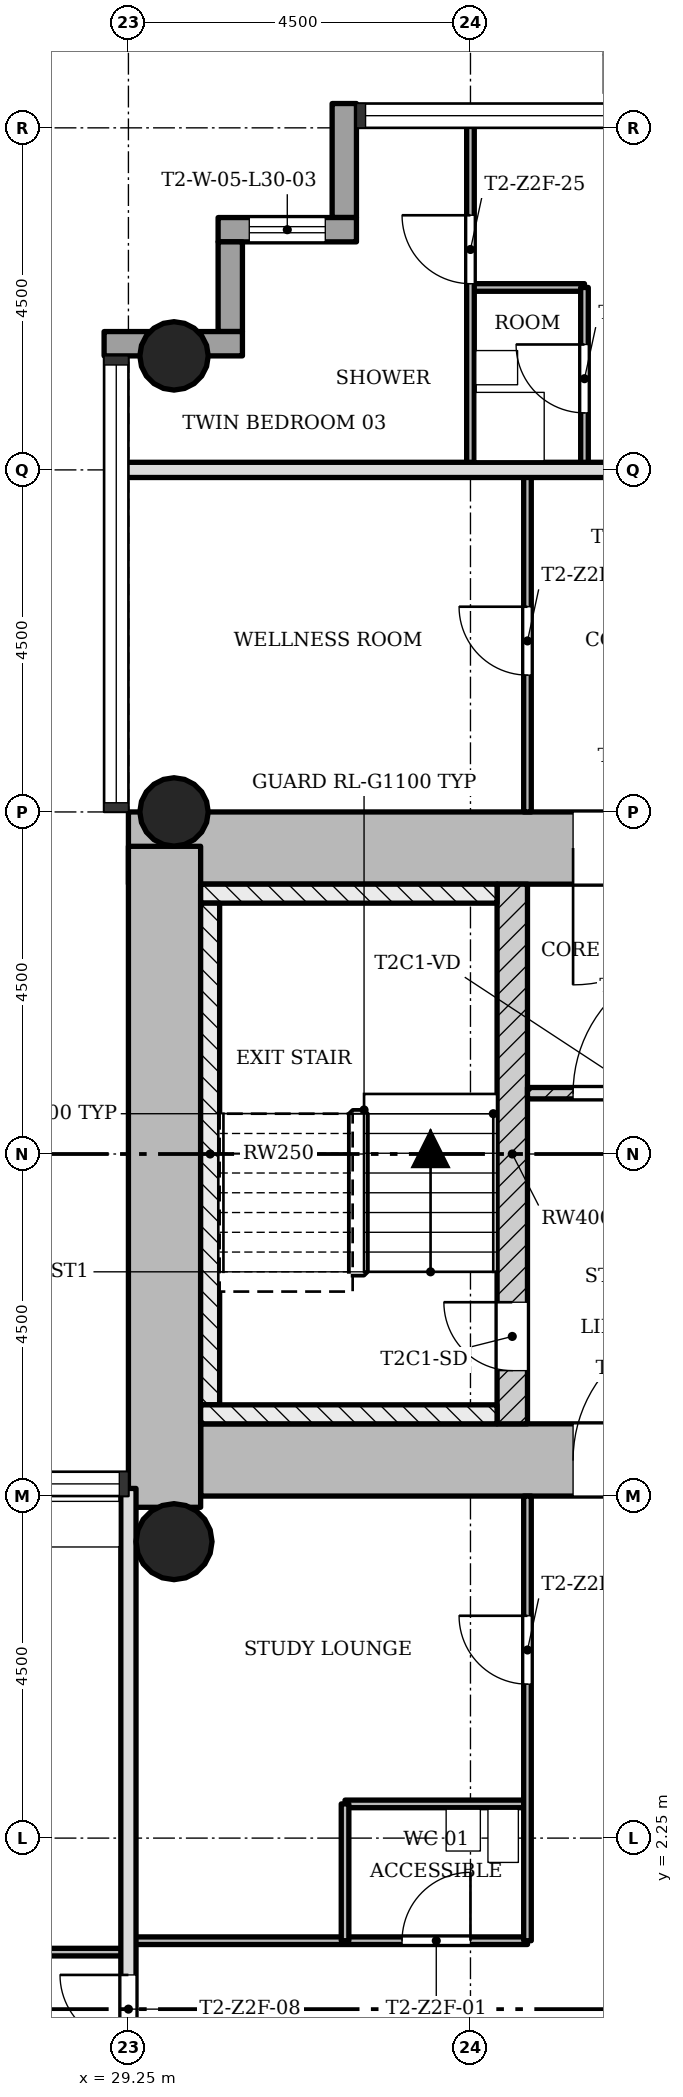
"""IFC4 building model, lengths in metres.
Left out: names, types, materials, properties, quantities, classifications, styles, units other than length and angle.
Written with IfcOpenShell. Run it as: python <this file> out.ifc"""

import sys

from ifc_helpers import new_model, si_unit, direction, frame, frame_2d, origin, origin_2d, place, context, subcontext, project, spatial, rectangle, hollow_circle, extrude, element, fill, save


model = new_model("IFC4")
c1 = context("Model", 3, precision=1e-05, world=origin(), true_north=direction((0.0, 1.0)))
c2 = subcontext(c1, "Body", "Model", "MODEL_VIEW")
j1 = project(units=[si_unit("LENGTHUNIT", "METRE"), si_unit("PLANEANGLEUNIT", "RADIAN")], contexts=[c1])
p1 = place(None, origin())
s1 = spatial("IfcSite", under=j1, at=p1, CompositionType="ELEMENT")
p2 = place(p1, origin())
s2 = spatial("IfcBuilding", under=s1, at=p2, CompositionType="ELEMENT")
p3 = place(p2, frame((0.0, 0.0, 110.6)))
s3 = spatial("IfcBuildingStorey", under=s2, at=p3, CompositionType="ELEMENT", Elevation=110.6)
p4 = place(p3, frame((30.2, 7.225, 0.0), z_axis=(0.0, 0.0, 1.0), x_axis=(1.0, 0.0, 0.0)))
e1 = element("IfcWall", 1, at=p4, inside=s3, PredefinedType="SHEAR", context=c2, shape_type="SweptSolid", body=[
    extrude(rectangle(XDim=12.55, YDim=0.95, at=frame_2d((6.275, 0.0))), origin(), (0.0, 0.0, 1.0), 3.4),
])
p5 = place(p4, frame((4.9, 0.0, 0.0)))
e2 = element("IfcOpeningElement", 2, at=p5, cuts=e1, PredefinedType="OPENING", context=c2, shape_type="SweptSolid", body=[
    extrude(rectangle(XDim=1.8, YDim=2.1, at=frame_2d((0.9, 1.05))), frame((0.0, 0.485, 0.0), z_axis=(0.0, -1.0, 0.0), x_axis=(1.0, 0.0, 0.0)), (0.0, 0.0, 1.0), 0.97),
])
p6 = place(p3, frame((41.8, 15.275, 0.0), z_axis=(0.0, 0.0, 1.0), x_axis=(-1.0, 0.0, 0.0)))
e3 = element("IfcWall", 3, at=p6, inside=s3, PredefinedType="SHEAR", context=c2, shape_type="SweptSolid", body=[
    extrude(rectangle(XDim=12.55, YDim=0.95, at=frame_2d((6.275, 0.0))), origin(), (0.0, 0.0, 1.0), 3.4),
])
p7 = place(p6, frame((4.9, 0.0, 0.0)))
e4 = element("IfcOpeningElement", 4, at=p7, cuts=e3, PredefinedType="OPENING", context=c2, shape_type="SweptSolid", body=[
    extrude(rectangle(XDim=1.8, YDim=2.1, at=frame_2d((0.9, 1.05))), frame((0.0, 0.485, 0.0), z_axis=(0.0, -1.0, 0.0), x_axis=(1.0, 0.0, 0.0)), (0.0, 0.0, 1.0), 0.97),
])
p8 = place(p3, frame((29.725, 15.298, 0.0), z_axis=(0.0, 0.0, 1.0), x_axis=(0.0, -1.0, 0.0)))
e5 = element("IfcWall", 5, at=p8, inside=s3, PredefinedType="SHEAR", context=c2, shape_type="SweptSolid", body=[
    extrude(rectangle(XDim=8.696, YDim=0.95, at=frame_2d((4.348, 0.0))), origin(), (0.0, 0.0, 1.0), 3.4),
])
p9 = place(p3, frame((34.3, 7.7, 0.0), z_axis=(0.0, 0.0, 1.0), x_axis=(0.0, 1.0, 0.0)))
e6 = element("IfcWall", 6, at=p9, inside=s3, PredefinedType="SHEAR", context=c2, shape_type="SweptSolid", body=[
    extrude(rectangle(XDim=7.1, YDim=0.4, at=frame_2d((3.55, 0.0))), origin(), (0.0, 0.0, 1.0), 3.4),
])
p10 = place(p9, frame((0.7, 0.0, 0.0)))
e7 = element("IfcOpeningElement", 7, at=p10, cuts=e6, PredefinedType="OPENING", context=c2, shape_type="SweptSolid", body=[
    extrude(rectangle(XDim=0.9, YDim=2.1, at=frame_2d((0.45, 1.05))), frame((0.0, 0.21, 0.0), z_axis=(0.0, -1.0, 0.0), x_axis=(1.0, 0.0, 0.0)), (0.0, 0.0, 1.0), 0.42),
])
for number, where, z_axis, x_axis in (
    (8, (29.85, 15.75, 0.0), (0.0, 0.0, 1.0), (1.0, 0.0, 0.0)),
    (9, (29.85, 21.75, 0.0), (0.0, 0.0, 1.0), (1.0, 0.0, 0.0)),
):
    element("IfcColumn", number, at=place(p3, frame(where, z_axis=z_axis, x_axis=x_axis)), inside=s3, PredefinedType="COLUMN", context=c2, shape_type="SweptSolid", body=[
        extrude(hollow_circle(Radius=0.45, WallThickness=0.032, at=origin_2d()), origin(), (0.0, 0.0, 1.0), 3.4),
    ])
p11 = place(p3, frame((29.85, 6.15, 0.0), z_axis=(0.0, 0.0, 1.0), x_axis=(1.0, 0.0, 0.0)))
e10 = element("IfcColumn", 10, at=p11, inside=s3, PredefinedType="COLUMN", context=c2, shape_type="SweptSolid", body=[
    extrude(hollow_circle(Radius=0.5, WallThickness=0.036, at=origin_2d()), origin(), (0.0, 0.0, 1.0), 3.4),
])
p12 = place(p3, frame((32.09, 25.07, -0.3), z_axis=(0.0, 0.0, 1.0), x_axis=(0.0, -1.0, 0.0)))
e11 = element("IfcWall", 11, at=p12, inside=s3, PredefinedType="STANDARD", context=c2, shape_type="SweptSolid", body=[
    extrude(rectangle(XDim=1.5, YDim=0.32, at=frame_2d((0.75, 0.0))), origin(), (0.0, 0.0, 1.0), 3.4),
])
p13 = place(p3, frame((32.25, 23.41, -0.3), z_axis=(0.0, 0.0, 1.0), x_axis=(-1.0, 0.0, 0.0)))
e12 = element("IfcWall", 12, at=p13, inside=s3, PredefinedType="STANDARD", context=c2, shape_type="SweptSolid", body=[
    extrude(rectangle(XDim=1.82, YDim=0.32, at=frame_2d((0.91, 0.0))), origin(), (0.0, 0.0, 1.0), 3.4),
])
p14 = place(p13, frame((0.41, 0.0, 1.2)))
e13 = element("IfcOpeningElement", 13, at=p14, cuts=e12, PredefinedType="OPENING", context=c2, shape_type="SweptSolid", body=[
    extrude(rectangle(XDim=1.0, YDim=1.5, at=frame_2d((0.5, 0.75))), frame((0.0, 0.17, 0.0), z_axis=(0.0, -1.0, 0.0), x_axis=(1.0, 0.0, 0.0)), (0.0, 0.0, 1.0), 0.34),
])
p15 = place(p3, frame((30.59, 23.25, -0.3), z_axis=(0.0, 0.0, 1.0), x_axis=(0.0, -1.0, 0.0)))
e14 = element("IfcWall", 14, at=p15, inside=s3, PredefinedType="STANDARD", context=c2, shape_type="SweptSolid", body=[
    extrude(rectangle(XDim=1.18, YDim=0.32, at=frame_2d((0.59, 0.0))), origin(), (0.0, 0.0, 1.0), 3.4),
])
p16 = place(p3, frame((30.75, 21.91, -0.3), z_axis=(0.0, 0.0, 1.0), x_axis=(-1.0, 0.0, 0.0)))
e15 = element("IfcWall", 15, at=p16, inside=s3, PredefinedType="STANDARD", context=c2, shape_type="SweptSolid", body=[
    extrude(rectangle(XDim=1.82, YDim=0.32, at=frame_2d((0.91, 0.0))), origin(), (0.0, 0.0, 1.0), 3.4),
])
p17 = place(p3, frame((37.5, 12.05, 0.0), z_axis=(0.0, 0.0, 1.0), x_axis=(-1.0, 0.0, 0.0)))
e16 = element("IfcWall", 16, at=p17, inside=s3, PredefinedType="PARTITIONING", context=c2, shape_type="SweptSolid", body=[
    extrude(rectangle(XDim=3.0, YDim=0.15, at=frame_2d((1.5, 0.0))), origin(), (0.0, 0.0, 1.0), 3.0),
])
p18 = place(p17, frame((0.6, 0.0, 0.0)))
e17 = element("IfcOpeningElement", 17, at=p18, cuts=e16, PredefinedType="OPENING", context=c2, shape_type="SweptSolid", body=[
    extrude(rectangle(XDim=1.8, YDim=2.1, at=frame_2d((0.9, 1.05))), frame((0.0, 0.085, 0.0), z_axis=(0.0, -1.0, 0.0), x_axis=(1.0, 0.0, 0.0)), (0.0, 0.0, 1.0), 0.17),
])
p19 = place(p3, frame((29.25, 0.75, 0.0), z_axis=(0.0, 0.0, 1.0), x_axis=(-1.0, 0.0, 0.0)))
e18 = element("IfcWall", 18, at=p19, inside=s3, PredefinedType="PARTITIONING", context=c2, shape_type="SweptSolid", body=[
    extrude(rectangle(XDim=7.8, YDim=0.1, at=frame_2d((3.9, 0.0))), origin(), (0.0, 0.0, 1.0), 3.0),
])
p20 = place(p19, frame((1.8, 0.0, 0.0)))
e19 = element("IfcOpeningElement", 19, at=p20, cuts=e18, PredefinedType="OPENING", context=c2, shape_type="SweptSolid", body=[
    extrude(rectangle(XDim=0.9, YDim=2.1, at=frame_2d((0.45, 1.05))), frame((0.0, 0.06, 0.0), z_axis=(0.0, -1.0, 0.0), x_axis=(1.0, 0.0, 0.0)), (0.0, 0.0, 1.0), 0.12),
])
p21 = place(p19, frame((4.95, 0.0, 0.0)))
e20 = element("IfcOpeningElement", 20, at=p21, cuts=e18, PredefinedType="OPENING", context=c2, shape_type="SweptSolid", body=[
    extrude(rectangle(XDim=0.9, YDim=2.1, at=frame_2d((0.45, 1.05))), frame((0.0, 0.06, 0.0), z_axis=(0.0, -1.0, 0.0), x_axis=(1.0, 0.0, 0.0)), (0.0, 0.0, 1.0), 0.12),
])
p22 = place(p19, frame((6.6, 0.0, 0.0)))
e21 = element("IfcOpeningElement", 21, at=p22, cuts=e18, PredefinedType="OPENING", context=c2, shape_type="SweptSolid", body=[
    extrude(rectangle(XDim=0.9, YDim=2.1, at=frame_2d((0.45, 1.05))), frame((0.0, 0.06, 0.0), z_axis=(0.0, -1.0, 0.0), x_axis=(1.0, 0.0, 0.0)), (0.0, 0.0, 1.0), 0.12),
])
p23 = place(p3, frame((34.5, 0.9, 0.0), z_axis=(0.0, 0.0, 1.0), x_axis=(-1.0, 0.0, 0.0)))
e22 = element("IfcWall", 22, at=p23, inside=s3, PredefinedType="PARTITIONING", context=c2, shape_type="SweptSolid", body=[
    extrude(rectangle(XDim=5.25, YDim=0.1, at=frame_2d((2.625, 0.0))), origin(), (0.0, 0.0, 1.0), 3.0),
])
p24 = place(p23, frame((0.75, 0.0, 0.0)))
e23 = element("IfcOpeningElement", 23, at=p24, cuts=e22, PredefinedType="OPENING", context=c2, shape_type="SweptSolid", body=[
    extrude(rectangle(XDim=0.9, YDim=2.1, at=frame_2d((0.45, 1.05))), frame((0.0, 0.06, 0.0), z_axis=(0.0, -1.0, 0.0), x_axis=(1.0, 0.0, 0.0)), (0.0, 0.0, 1.0), 0.12),
])
p25 = place(p3, frame((34.5, 2.7, 0.0), z_axis=(0.0, 0.0, 1.0), x_axis=(-1.0, 0.0, 0.0)))
e24 = element("IfcWall", 24, at=p25, inside=s3, PredefinedType="PARTITIONING", context=c2, shape_type="SweptSolid", body=[
    extrude(rectangle(XDim=2.4, YDim=0.1, at=frame_2d((1.2, 0.0))), origin(), (0.0, 0.0, 1.0), 3.0),
])
p26 = place(p3, frame((42.85, 20.25, 0.0), z_axis=(0.0, 0.0, 1.0), x_axis=(-1.0, 0.0, 0.0)))
e25 = element("IfcWall", 25, at=p26, inside=s3, PredefinedType="SOLIDWALL", context=c2, shape_type="SweptSolid", body=[
    extrude(rectangle(XDim=13.7, YDim=0.2, at=frame_2d((6.85, 0.0))), origin(), (0.0, 0.0, 1.0), 3.0),
])
p27 = place(p26, frame((6.4, 0.0, 0.0)))
e26 = element("IfcOpeningElement", 26, at=p27, cuts=e25, PredefinedType="OPENING", context=c2, shape_type="SweptSolid", body=[
    extrude(rectangle(XDim=0.9, YDim=2.1, at=frame_2d((0.45, 1.05))), frame((0.0, 0.11, 0.0), z_axis=(0.0, -1.0, 0.0), x_axis=(1.0, 0.0, 0.0)), (0.0, 0.0, 1.0), 0.22),
])
p28 = place(p3, frame((35.25, 22.65, 0.0), z_axis=(0.0, 0.0, 1.0), x_axis=(-1.0, 0.0, 0.0)))
e27 = element("IfcWall", 27, at=p28, inside=s3, PredefinedType="PARTITIONING", context=c2, shape_type="SweptSolid", body=[
    extrude(rectangle(XDim=1.5, YDim=0.1, at=frame_2d((0.75, 0.0))), origin(), (0.0, 0.0, 1.0), 3.0),
])
p29 = place(p3, frame((35.25, 20.25, 0.0), z_axis=(0.0, 0.0, 1.0), x_axis=(0.0, 1.0, 0.0)))
e28 = element("IfcWall", 28, at=p29, inside=s3, PredefinedType="PARTITIONING", context=c2, shape_type="SweptSolid", body=[
    extrude(rectangle(XDim=2.4, YDim=0.1, at=frame_2d((1.2, 0.0))), origin(), (0.0, 0.0, 1.0), 3.0),
])
p30 = place(p29, frame((0.75, 0.0, 0.0)))
e29 = element("IfcOpeningElement", 29, at=p30, cuts=e28, PredefinedType="OPENING", context=c2, shape_type="SweptSolid", body=[
    extrude(rectangle(XDim=0.9, YDim=2.1, at=frame_2d((0.45, 1.05))), frame((0.0, 0.06, 0.0), z_axis=(0.0, -1.0, 0.0), x_axis=(1.0, 0.0, 0.0)), (0.0, 0.0, 1.0), 0.12),
])
p31 = place(p3, frame((34.5, 0.9, 0.0), z_axis=(0.0, 0.0, 1.0), x_axis=(0.0, 1.0, 0.0)))
e30 = element("IfcWall", 30, at=p31, inside=s3, PredefinedType="PARTITIONING", context=c2, shape_type="SweptSolid", body=[
    extrude(rectangle(XDim=5.85, YDim=0.1, at=frame_2d((2.925, 0.0))), origin(), (0.0, 0.0, 1.0), 3.0),
])
p32 = place(p31, frame((3.375, 0.0, 0.0)))
e31 = element("IfcOpeningElement", 31, at=p32, cuts=e30, PredefinedType="OPENING", context=c2, shape_type="SweptSolid", body=[
    extrude(rectangle(XDim=0.9, YDim=2.1, at=frame_2d((0.45, 1.05))), frame((0.0, 0.06, 0.0), z_axis=(0.0, -1.0, 0.0), x_axis=(1.0, 0.0, 0.0)), (0.0, 0.0, 1.0), 0.12),
])
p33 = place(p3, frame((34.5, 15.75, 0.0), z_axis=(0.0, 0.0, 1.0), x_axis=(0.0, 1.0, 0.0)))
e32 = element("IfcWall", 32, at=p33, inside=s3, PredefinedType="PARTITIONING", context=c2, shape_type="SweptSolid", body=[
    extrude(rectangle(XDim=4.5, YDim=0.1, at=frame_2d((2.25, 0.0))), origin(), (0.0, 0.0, 1.0), 3.0),
])
p34 = place(p33, frame((1.8, 0.0, 0.0)))
e33 = element("IfcOpeningElement", 33, at=p34, cuts=e32, PredefinedType="OPENING", context=c2, shape_type="SweptSolid", body=[
    extrude(rectangle(XDim=0.9, YDim=2.1, at=frame_2d((0.45, 1.05))), frame((0.0, 0.06, 0.0), z_axis=(0.0, -1.0, 0.0), x_axis=(1.0, 0.0, 0.0)), (0.0, 0.0, 1.0), 0.12),
])
p35 = place(p3, frame((33.75, 20.25, 0.0), z_axis=(0.0, 0.0, 1.0), x_axis=(0.0, 1.0, 0.0)))
e34 = element("IfcWall", 34, at=p35, inside=s3, PredefinedType="PARTITIONING", context=c2, shape_type="SweptSolid", body=[
    extrude(rectangle(XDim=4.6, YDim=0.1, at=frame_2d((2.3, 0.0))), origin(), (0.0, 0.0, 1.0), 3.0),
])
p36 = place(p35, frame((2.45, 0.0, 0.0)))
e35 = element("IfcOpeningElement", 35, at=p36, cuts=e34, PredefinedType="OPENING", context=c2, shape_type="SweptSolid", body=[
    extrude(rectangle(XDim=0.9, YDim=2.1, at=frame_2d((0.45, 1.05))), frame((0.0, 0.06, 0.0), z_axis=(0.0, -1.0, 0.0), x_axis=(1.0, 0.0, 0.0)), (0.0, 0.0, 1.0), 0.12),
])
p37 = place(p3, frame((32.1, 0.9, 0.0), z_axis=(0.0, 0.0, 1.0), x_axis=(0.0, 1.0, 0.0)))
e36 = element("IfcWall", 36, at=p37, inside=s3, PredefinedType="PARTITIONING", context=c2, shape_type="SweptSolid", body=[
    extrude(rectangle(XDim=1.8, YDim=0.1, at=frame_2d((0.9, 0.0))), origin(), (0.0, 0.0, 1.0), 3.0),
])
p38 = place(p3, frame((29.25, -6.85, 0.0), z_axis=(0.0, 0.0, 1.0), x_axis=(0.0, 1.0, 0.0)))
e37 = element("IfcWall", 37, at=p38, inside=s3, PredefinedType="SOLIDWALL", context=c2, shape_type="SweptSolid", body=[
    extrude(rectangle(XDim=13.7, YDim=0.2, at=frame_2d((6.85, 0.0))), origin(), (0.0, 0.0, 1.0), 3.0),
])
p39 = place(p38, frame((6.4, 0.0, 0.0)))
e38 = element("IfcOpeningElement", 38, at=p39, cuts=e37, PredefinedType="OPENING", context=c2, shape_type="SweptSolid", body=[
    extrude(rectangle(XDim=0.9, YDim=2.1, at=frame_2d((0.45, 1.05))), frame((0.0, 0.11, 0.0), z_axis=(0.0, -1.0, 0.0), x_axis=(1.0, 0.0, 0.0)), (0.0, 0.0, 1.0), 0.22),
])
p40 = place(p3, frame((34.1, 14.675, 0.0), z_axis=(0.0, 0.0, 1.0), x_axis=(-1.0, 0.0, 0.0)))
e39 = element("IfcWall", 39, at=p40, inside=s3, PredefinedType="SHEAR", context=c2, shape_type="SweptSolid", body=[
    extrude(rectangle(XDim=3.9, YDim=0.25, at=frame_2d((1.95, 0.0))), origin(), (0.0, 0.0, 1.0), 3.4),
])
p41 = place(p3, frame((30.325, 7.95, 0.0), z_axis=(0.0, 0.0, 1.0), x_axis=(0.0, 1.0, 0.0)))
e40 = element("IfcWall", 40, at=p41, inside=s3, PredefinedType="SHEAR", context=c2, shape_type="SweptSolid", body=[
    extrude(rectangle(XDim=6.6, YDim=0.25, at=frame_2d((3.3, 0.0))), origin(), (0.0, 0.0, 1.0), 3.4),
])
p42 = place(p3, frame((34.1, 7.825, 0.0), z_axis=(0.0, 0.0, 1.0), x_axis=(-1.0, 0.0, 0.0)))
e41 = element("IfcWall", 41, at=p42, inside=s3, PredefinedType="SHEAR", context=c2, shape_type="SweptSolid", body=[
    extrude(rectangle(XDim=3.9, YDim=0.25, at=frame_2d((1.95, 0.0))), origin(), (0.0, 0.0, 1.0), 3.4),
])
p43 = place(p18, origin())
e42 = element("IfcDoor", 42, at=p43, inside=s3, OperationType="SINGLE_SWING_LEFT", PredefinedType="DOOR", context=c2, shape_type="SweptSolid", body=[
    extrude(rectangle(XDim=1.8, YDim=2.1, at=frame_2d((0.9, 1.05))), frame((0.0, 0.025, 0.0), z_axis=(0.0, -1.0, 0.0), x_axis=(1.0, 0.0, 0.0)), (0.0, 0.0, 1.0), 0.05),
])
fill(e17, e42)
p44 = place(p24, origin())
e43 = element("IfcDoor", 43, at=p44, inside=s3, OperationType="SINGLE_SWING_LEFT", PredefinedType="DOOR", context=c2, shape_type="SweptSolid", body=[
    extrude(rectangle(XDim=0.9, YDim=2.1, at=frame_2d((0.45, 1.05))), frame((0.0, 0.025, 0.0), z_axis=(0.0, -1.0, 0.0), x_axis=(1.0, 0.0, 0.0)), (0.0, 0.0, 1.0), 0.05),
])
fill(e23, e43)
p45 = place(p32, origin())
e44 = element("IfcDoor", 44, at=p45, inside=s3, OperationType="SINGLE_SWING_LEFT", PredefinedType="DOOR", context=c2, shape_type="SweptSolid", body=[
    extrude(rectangle(XDim=0.9, YDim=2.1, at=frame_2d((0.45, 1.05))), frame((0.0, 0.025, 0.0), z_axis=(0.0, -1.0, 0.0), x_axis=(1.0, 0.0, 0.0)), (0.0, 0.0, 1.0), 0.05),
])
fill(e31, e44)
p46 = place(p39, origin())
e45 = element("IfcDoor", 45, at=p46, inside=s3, OperationType="SINGLE_SWING_LEFT", PredefinedType="DOOR", context=c2, shape_type="SweptSolid", body=[
    extrude(rectangle(XDim=0.9, YDim=2.1, at=frame_2d((0.45, 1.05))), frame((0.0, 0.025, 0.0), z_axis=(0.0, -1.0, 0.0), x_axis=(1.0, 0.0, 0.0)), (0.0, 0.0, 1.0), 0.05),
])
fill(e38, e45)
p47 = place(p34, origin())
e46 = element("IfcDoor", 46, at=p47, inside=s3, OperationType="SINGLE_SWING_LEFT", PredefinedType="DOOR", context=c2, shape_type="SweptSolid", body=[
    extrude(rectangle(XDim=0.9, YDim=2.1, at=frame_2d((0.45, 1.05))), frame((0.0, 0.025, 0.0), z_axis=(0.0, -1.0, 0.0), x_axis=(1.0, 0.0, 0.0)), (0.0, 0.0, 1.0), 0.05),
])
fill(e33, e46)
p48 = place(p30, origin())
e47 = element("IfcDoor", 47, at=p48, inside=s3, OperationType="SINGLE_SWING_LEFT", PredefinedType="DOOR", context=c2, shape_type="SweptSolid", body=[
    extrude(rectangle(XDim=0.9, YDim=2.1, at=frame_2d((0.45, 1.05))), frame((0.0, 0.025, 0.0), z_axis=(0.0, -1.0, 0.0), x_axis=(1.0, 0.0, 0.0)), (0.0, 0.0, 1.0), 0.05),
])
fill(e29, e47)
p49 = place(p36, origin())
e48 = element("IfcDoor", 48, at=p49, inside=s3, OperationType="SINGLE_SWING_LEFT", PredefinedType="DOOR", context=c2, shape_type="SweptSolid", body=[
    extrude(rectangle(XDim=0.9, YDim=2.1, at=frame_2d((0.45, 1.05))), frame((0.0, 0.025, 0.0), z_axis=(0.0, -1.0, 0.0), x_axis=(1.0, 0.0, 0.0)), (0.0, 0.0, 1.0), 0.05),
])
fill(e35, e48)
p50 = place(p10, origin())
e49 = element("IfcDoor", 49, at=p50, inside=s3, OperationType="SINGLE_SWING_LEFT", PredefinedType="DOOR", context=c2, shape_type="SweptSolid", body=[
    extrude(rectangle(XDim=0.9, YDim=2.1, at=frame_2d((0.45, 1.05))), frame((0.0, 0.025, 0.0), z_axis=(0.0, -1.0, 0.0), x_axis=(1.0, 0.0, 0.0)), (0.0, 0.0, 1.0), 0.05),
])
fill(e7, e49)
p51 = place(p5, origin())
e50 = element("IfcDoor", 50, at=p51, inside=s3, OperationType="SINGLE_SWING_LEFT", PredefinedType="DOOR", context=c2, shape_type="SweptSolid", body=[
    extrude(rectangle(XDim=1.8, YDim=2.1, at=frame_2d((0.9, 1.05))), frame((0.0, 0.025, 0.0), z_axis=(0.0, -1.0, 0.0), x_axis=(1.0, 0.0, 0.0)), (0.0, 0.0, 1.0), 0.05),
])
fill(e2, e50)
p52 = place(p7, origin())
e51 = element("IfcDoor", 51, at=p52, inside=s3, OperationType="SINGLE_SWING_LEFT", PredefinedType="DOOR", context=c2, shape_type="SweptSolid", body=[
    extrude(rectangle(XDim=1.8, YDim=2.1, at=frame_2d((0.9, 1.05))), frame((0.0, 0.025, 0.0), z_axis=(0.0, -1.0, 0.0), x_axis=(1.0, 0.0, 0.0)), (0.0, 0.0, 1.0), 0.05),
])
fill(e4, e51)
p53 = place(p14, origin())
e52 = element("IfcWindow", 52, at=p53, inside=s3, PartitioningType="SINGLE_PANEL", PredefinedType="WINDOW", context=c2, shape_type="SweptSolid", body=[
    extrude(rectangle(XDim=1.0, YDim=1.5, at=frame_2d((0.5, 0.75))), frame((0.0, 0.03, 0.0), z_axis=(0.0, -1.0, 0.0), x_axis=(1.0, 0.0, 0.0)), (0.0, 0.0, 1.0), 0.06),
])
fill(e13, e52)
save(model, sys.argv[1])
